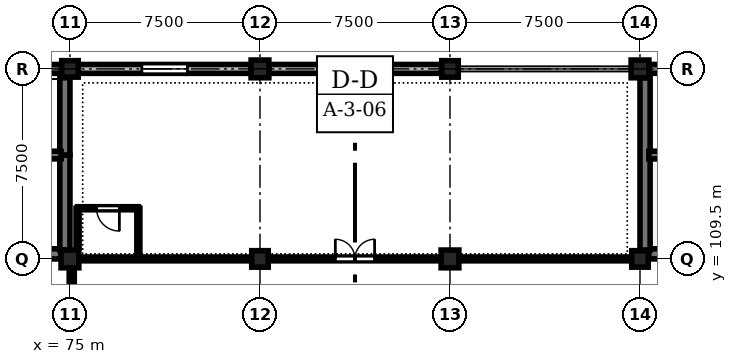
"""IFC4 building model, lengths in metres.
Left out: names, types, materials, properties, quantities, classifications, styles, units other than length and angle.
Written with IfcOpenShell. Run it as: python <this file> out.ifc"""

import sys

from ifc_helpers import new_model, si_unit, direction, frame, frame_2d, origin, origin_2d, place, context, subcontext, project, spatial, rectangle, extrude, element, fill, save


model = new_model("IFC4")
c1 = context("Model", 3, precision=1e-05, world=origin(), true_north=direction((0.0, 1.0)))
c2 = subcontext(c1, "Body", "Model", "MODEL_VIEW")
j1 = project(units=[si_unit("LENGTHUNIT", "METRE"), si_unit("PLANEANGLEUNIT", "RADIAN")], contexts=[c1])
p1 = place(None, origin())
s1 = spatial("IfcSite", under=j1, at=p1, CompositionType="ELEMENT")
p2 = place(p1, origin())
s2 = spatial("IfcBuilding", under=s1, at=p2, CompositionType="ELEMENT")
p3 = place(p2, frame((0.0, 0.0, 9.3)))
s3 = spatial("IfcBuildingStorey", under=s2, at=p3, CompositionType="ELEMENT", Elevation=9.3)
p4 = place(p3, frame((75.0, 109.5, 0.0), z_axis=(0.0, 0.0, 1.0), x_axis=(1.0, 0.0, 0.0)))
e1 = element("IfcColumn", 1, at=p4, inside=s3, PredefinedType="COLUMN", context=c2, shape_type="SweptSolid", body=[
    extrude(rectangle(XDim=0.7, YDim=0.7, at=origin_2d()), origin(), (0.0, 0.0, 1.0), 4.8),
])
for number, where, z_axis, x_axis in (
    (2, (75.0, 117.0, 0.0), (0.0, 0.0, 1.0), (1.0, 0.0, 0.0)),
    (3, (82.5, 109.5, 0.0), (0.0, 0.0, 1.0), (1.0, 0.0, 0.0)),
):
    element("IfcColumn", number, at=place(p3, frame(where, z_axis=z_axis, x_axis=x_axis)), inside=s3, PredefinedType="COLUMN", context=c2, shape_type="SweptSolid", body=[
        extrude(rectangle(XDim=0.65, YDim=0.65, at=origin_2d()), origin(), (0.0, 0.0, 1.0), 4.8),
    ])
for number, where, z_axis, x_axis in (
    (4, (82.5, 117.0, 0.0), (0.0, 0.0, 1.0), (1.0, 0.0, 0.0)),
    (5, (90.0, 109.5, 0.0), (0.0, 0.0, 1.0), (1.0, 0.0, 0.0)),
):
    element("IfcColumn", number, at=place(p3, frame(where, z_axis=z_axis, x_axis=x_axis)), inside=s3, PredefinedType="COLUMN", context=c2, shape_type="SweptSolid", body=[
        extrude(rectangle(XDim=0.7, YDim=0.7, at=origin_2d()), origin(), (0.0, 0.0, 1.0), 4.8),
    ])
for number, where, z_axis, x_axis in (
    (6, (90.0, 117.0, 0.0), (0.0, 0.0, 1.0), (1.0, 0.0, 0.0)),
    (7, (97.5, 109.5, 0.0), (0.0, 0.0, 1.0), (1.0, 0.0, 0.0)),
):
    element("IfcColumn", number, at=place(p3, frame(where, z_axis=z_axis, x_axis=x_axis)), inside=s3, PredefinedType="COLUMN", context=c2, shape_type="SweptSolid", body=[
        extrude(rectangle(XDim=0.65, YDim=0.65, at=origin_2d()), origin(), (0.0, 0.0, 1.0), 4.8),
    ])
p5 = place(p3, frame((97.5, 117.0, 0.0), z_axis=(0.0, 0.0, 1.0), x_axis=(1.0, 0.0, 0.0)))
e8 = element("IfcColumn", 8, at=p5, inside=s3, PredefinedType="COLUMN", context=c2, shape_type="SweptSolid", body=[
    extrude(rectangle(XDim=0.7, YDim=0.7, at=origin_2d()), origin(), (0.0, 0.0, 1.0), 4.8),
])
p6 = place(p3, frame((67.86, 117.0, 0.0), z_axis=(0.0, 0.0, 1.0), x_axis=(1.0, 0.0, 0.0)))
e9 = element("IfcWall", 9, at=p6, inside=s3, PredefinedType="SHEAR", context=c2, shape_type="SweptSolid", body=[
    extrude(rectangle(XDim=6.805, YDim=0.35, at=frame_2d((3.402, 0.0))), origin(), (0.0, 0.0, 1.0), 4.55),
])
p7 = place(p3, frame((75.335, 117.0, 0.0), z_axis=(0.0, 0.0, 1.0), x_axis=(1.0, 0.0, 0.0)))
e10 = element("IfcWall", 10, at=p7, inside=s3, PredefinedType="STANDARD", context=c2, shape_type="SweptSolid", body=[
    extrude(rectangle(XDim=6.805, YDim=0.35, at=frame_2d((3.402, 0.0))), origin(), (0.0, 0.0, 1.0), 3.95),
])
p8 = place(p7, frame((2.502, 0.0, 0.9)))
e11 = element("IfcOpeningElement", 11, at=p8, cuts=e10, PredefinedType="OPENING", context=c2, shape_type="SweptSolid", body=[
    extrude(rectangle(XDim=1.8, YDim=1.8, at=frame_2d((0.9, 0.9))), frame((0.0, 0.185, 0.0), z_axis=(0.0, -1.0, 0.0), x_axis=(1.0, 0.0, 0.0)), (0.0, 0.0, 1.0), 0.37),
])
p9 = place(p3, frame((82.86, 117.0, 0.0), z_axis=(0.0, 0.0, 1.0), x_axis=(1.0, 0.0, 0.0)))
e12 = element("IfcWall", 12, at=p9, inside=s3, PredefinedType="STANDARD", context=c2, shape_type="SweptSolid", body=[
    extrude(rectangle(XDim=6.805, YDim=0.35, at=frame_2d((3.402, 0.0))), origin(), (0.0, 0.0, 1.0), 3.95),
])
p10 = place(p9, frame((2.502, 0.0, 0.9)))
e13 = element("IfcOpeningElement", 13, at=p10, cuts=e12, PredefinedType="OPENING", context=c2, shape_type="SweptSolid", body=[
    extrude(rectangle(XDim=1.8, YDim=2.4, at=frame_2d((0.9, 1.2))), frame((0.0, 0.185, 0.0), z_axis=(0.0, -1.0, 0.0), x_axis=(1.0, 0.0, 0.0)), (0.0, 0.0, 1.0), 0.37),
])
p11 = place(p3, frame((97.86, 117.0, 0.0), z_axis=(0.0, 0.0, 1.0), x_axis=(1.0, 0.0, 0.0)))
e14 = element("IfcWall", 14, at=p11, inside=s3, PredefinedType="SHEAR", context=c2, shape_type="SweptSolid", body=[
    extrude(rectangle(XDim=6.805, YDim=0.35, at=frame_2d((3.402, 0.0))), origin(), (0.0, 0.0, 1.0), 4.55),
])
p12 = place(p3, frame((68.4, 109.7, 0.0), z_axis=(0.0, 0.0, 1.0), x_axis=(1.0, 0.0, 0.0)))
e15 = element("IfcWall", 15, at=p12, inside=s3, PredefinedType="SHEAR", context=c2, shape_type="SweptSolid", body=[
    extrude(rectangle(XDim=6.25, YDim=0.4, at=frame_2d((3.125, 0.0))), origin(), (0.0, 0.0, 1.0), 4.55),
])
p13 = place(p12, frame((2.2, 0.0, 0.0)))
e16 = element("IfcOpeningElement", 16, at=p13, cuts=e15, PredefinedType="OPENING", context=c2, shape_type="SweptSolid", body=[
    extrude(rectangle(XDim=1.8, YDim=2.25, at=frame_2d((0.9, 1.125))), frame((0.0, 0.21, 0.0), z_axis=(0.0, -1.0, 0.0), x_axis=(1.0, 0.0, 0.0)), (0.0, 0.0, 1.0), 0.42),
])
p14 = place(p3, frame((74.8, 109.85, 0.0), z_axis=(0.0, 0.0, 1.0), x_axis=(0.0, 1.0, 0.0)))
e17 = element("IfcWall", 17, at=p14, inside=s3, PredefinedType="SHEAR", context=c2, shape_type="SweptSolid", body=[
    extrude(rectangle(XDim=3.75, YDim=0.4, at=frame_2d((1.875, 0.0))), origin(), (0.0, 0.0, 1.0), 4.55),
])
p15 = place(p3, frame((74.8, 113.6, 0.0), z_axis=(0.0, 0.0, 1.0), x_axis=(0.0, 1.0, 0.0)))
e18 = element("IfcWall", 18, at=p15, inside=s3, PredefinedType="SHEAR", context=c2, shape_type="SweptSolid", body=[
    extrude(rectangle(XDim=3.05, YDim=0.4, at=frame_2d((1.525, 0.0))), origin(), (0.0, 0.0, 1.0), 4.55),
])
p16 = place(p3, frame((68.4, 113.6, 0.0), z_axis=(0.0, 0.0, 1.0), x_axis=(1.0, 0.0, 0.0)))
e19 = element("IfcWall", 19, at=p16, inside=s3, PredefinedType="SHEAR", context=c2, shape_type="SweptSolid", body=[
    extrude(rectangle(XDim=6.25, YDim=0.3, at=frame_2d((3.125, 0.0))), origin(), (0.0, 0.0, 1.0), 4.55),
])
p17 = place(p16, frame((0.95, 0.0, 0.0)))
e20 = element("IfcOpeningElement", 20, at=p17, cuts=e19, PredefinedType="OPENING", context=c2, shape_type="SweptSolid", body=[
    extrude(rectangle(XDim=1.3, YDim=2.2, at=frame_2d((0.65, 1.1))), frame((0.0, 0.16, 0.0), z_axis=(0.0, -1.0, 0.0), x_axis=(1.0, 0.0, 0.0)), (0.0, 0.0, 1.0), 0.32),
])
p18 = place(p16, frame((4.15, 0.0, 0.0)))
e21 = element("IfcOpeningElement", 21, at=p18, cuts=e19, PredefinedType="OPENING", context=c2, shape_type="SweptSolid", body=[
    extrude(rectangle(XDim=1.3, YDim=2.2, at=frame_2d((0.65, 1.1))), frame((0.0, 0.16, 0.0), z_axis=(0.0, -1.0, 0.0), x_axis=(1.0, 0.0, 0.0)), (0.0, 0.0, 1.0), 0.32),
])
p19 = place(p3, frame((97.85, 109.7, 0.0), z_axis=(0.0, 0.0, 1.0), x_axis=(1.0, 0.0, 0.0)))
e22 = element("IfcWall", 22, at=p19, inside=s3, PredefinedType="SHEAR", context=c2, shape_type="SweptSolid", body=[
    extrude(rectangle(XDim=8.05, YDim=0.4, at=frame_2d((4.025, 0.0))), origin(), (0.0, 0.0, 1.0), 4.55),
])
p20 = place(p3, frame((97.7, 109.85, 0.0), z_axis=(0.0, 0.0, 1.0), x_axis=(0.0, 1.0, 0.0)))
e23 = element("IfcWall", 23, at=p20, inside=s3, PredefinedType="SHEAR", context=c2, shape_type="SweptSolid", body=[
    extrude(rectangle(XDim=6.8, YDim=0.4, at=frame_2d((3.4, 0.0))), origin(), (0.0, 0.0, 1.0), 4.55),
])
p21 = place(p3, frame((97.85, 113.6, 0.0), z_axis=(0.0, 0.0, 1.0), x_axis=(1.0, 0.0, 0.0)))
e24 = element("IfcWall", 24, at=p21, inside=s3, PredefinedType="SHEAR", context=c2, shape_type="SweptSolid", body=[
    extrude(rectangle(XDim=8.05, YDim=0.3, at=frame_2d((4.025, 0.0))), origin(), (0.0, 0.0, 1.0), 4.55),
])
p22 = place(p3, frame((75.3, 109.5, 0.0), z_axis=(0.0, 0.0, 1.0), x_axis=(1.0, 0.0, 0.0)))
e25 = element("IfcWall", 25, at=p22, inside=s3, PredefinedType="PARTITIONING", context=c2, shape_type="SweptSolid", body=[
    extrude(rectangle(XDim=21.9, YDim=0.15, at=frame_2d((10.95, 0.0))), origin(), (0.0, 0.0, 1.0), 3.985),
])
p23 = place(p22, frame((10.175, 0.0, 0.0)))
e26 = element("IfcOpeningElement", 26, at=p23, cuts=e25, PredefinedType="OPENING", context=c2, shape_type="SweptSolid", body=[
    extrude(rectangle(XDim=1.55, YDim=2.35, at=frame_2d((0.775, 1.175))), frame((0.0, 0.085, 0.0), z_axis=(0.0, -1.0, 0.0), x_axis=(1.0, 0.0, 0.0)), (0.0, 0.0, 1.0), 0.17),
])
p24 = place(p3, frame((77.7, 111.5, 0.0), z_axis=(0.0, 0.0, 1.0), x_axis=(-1.0, 0.0, 0.0)))
e27 = element("IfcWall", 27, at=p24, inside=s3, PredefinedType="PARTITIONING", context=c2, shape_type="SweptSolid", body=[
    extrude(rectangle(XDim=2.4, YDim=0.12, at=frame_2d((1.2, 0.0))), origin(), (0.0, 0.0, 1.0), 4.535),
])
p25 = place(p24, frame((0.75, 0.0, 0.0)))
e28 = element("IfcOpeningElement", 28, at=p25, cuts=e27, PredefinedType="OPENING", context=c2, shape_type="SweptSolid", body=[
    extrude(rectangle(XDim=0.9, YDim=2.1, at=frame_2d((0.45, 1.05))), frame((0.0, 0.07, 0.0), z_axis=(0.0, -1.0, 0.0), x_axis=(1.0, 0.0, 0.0)), (0.0, 0.0, 1.0), 0.14),
])
p26 = place(p3, frame((77.7, 109.5, 0.0), z_axis=(0.0, 0.0, 1.0), x_axis=(0.0, 1.0, 0.0)))
e29 = element("IfcWall", 29, at=p26, inside=s3, PredefinedType="PARTITIONING", context=c2, shape_type="SweptSolid", body=[
    extrude(rectangle(XDim=2.0, YDim=0.12, at=frame_2d((1.0, 0.0))), origin(), (0.0, 0.0, 1.0), 4.535),
])
p27 = place(p3, frame((75.3, 109.95, 0.0), z_axis=(0.0, 0.0, 1.0), x_axis=(0.0, 1.0, 0.0)))
e30 = element("IfcWall", 30, at=p27, inside=s3, PredefinedType="PARTITIONING", context=c2, shape_type="SweptSolid", body=[
    extrude(rectangle(XDim=1.55, YDim=0.12, at=frame_2d((0.775, 0.0))), origin(), (0.0, 0.0, 1.0), 3.985),
])
p28 = place(p3, frame((75.07, 105.8, 0.0), z_axis=(0.0, 0.0, 1.0), x_axis=(0.0, 1.0, 0.0)))
e31 = element("IfcWall", 31, at=p28, inside=s3, PredefinedType="STANDARD", context=c2, shape_type="SweptSolid", body=[
    extrude(rectangle(XDim=3.3, YDim=0.2, at=frame_2d((1.65, 0.0))), origin(), (0.0, 0.0, 1.0), 3.835),
])
p29 = place(p28, frame((0.65, 0.0, 0.0)))
e32 = element("IfcOpeningElement", 32, at=p29, cuts=e31, PredefinedType="OPENING", context=c2, shape_type="SweptSolid", body=[
    extrude(rectangle(XDim=2.0, YDim=2.3, at=frame_2d((1.0, 1.15))), frame((0.0, 0.11, 0.0), z_axis=(0.0, -1.0, 0.0), x_axis=(1.0, 0.0, 0.0)), (0.0, 0.0, 1.0), 0.22),
])
p30 = place(p8, origin())
e33 = element("IfcWindow", 33, at=p30, inside=s3, PartitioningType="SINGLE_PANEL", PredefinedType="WINDOW", context=c2, shape_type="SweptSolid", body=[
    extrude(rectangle(XDim=1.8, YDim=1.8, at=frame_2d((0.9, 0.9))), frame((0.0, 0.03, 0.0), z_axis=(0.0, -1.0, 0.0), x_axis=(1.0, 0.0, 0.0)), (0.0, 0.0, 1.0), 0.06),
])
fill(e11, e33)
p31 = place(p10, origin())
e34 = element("IfcWindow", 34, at=p31, inside=s3, PartitioningType="SINGLE_PANEL", PredefinedType="WINDOW", context=c2, shape_type="SweptSolid", body=[
    extrude(rectangle(XDim=1.8, YDim=2.4, at=frame_2d((0.9, 1.2))), frame((0.0, 0.03, 0.0), z_axis=(0.0, -1.0, 0.0), x_axis=(1.0, 0.0, 0.0)), (0.0, 0.0, 1.0), 0.06),
])
fill(e13, e34)
p32 = place(p23, origin())
e35 = element("IfcDoor", 35, at=p32, inside=s3, OperationType="DOUBLE_DOOR_SINGLE_SWING", PredefinedType="DOOR", context=c2, shape_type="SweptSolid", body=[
    extrude(rectangle(XDim=1.55, YDim=2.35, at=frame_2d((0.775, 1.175))), frame((0.0, 0.025, 0.0), z_axis=(0.0, -1.0, 0.0), x_axis=(1.0, 0.0, 0.0)), (0.0, 0.0, 1.0), 0.05),
])
fill(e26, e35)
p33 = place(p25, origin())
e36 = element("IfcDoor", 36, at=p33, inside=s3, OperationType="SINGLE_SWING_LEFT", PredefinedType="DOOR", context=c2, shape_type="SweptSolid", body=[
    extrude(rectangle(XDim=0.9, YDim=2.1, at=frame_2d((0.45, 1.05))), frame((0.0, 0.025, 0.0), z_axis=(0.0, -1.0, 0.0), x_axis=(1.0, 0.0, 0.0)), (0.0, 0.0, 1.0), 0.05),
])
fill(e28, e36)
save(model, sys.argv[1])
